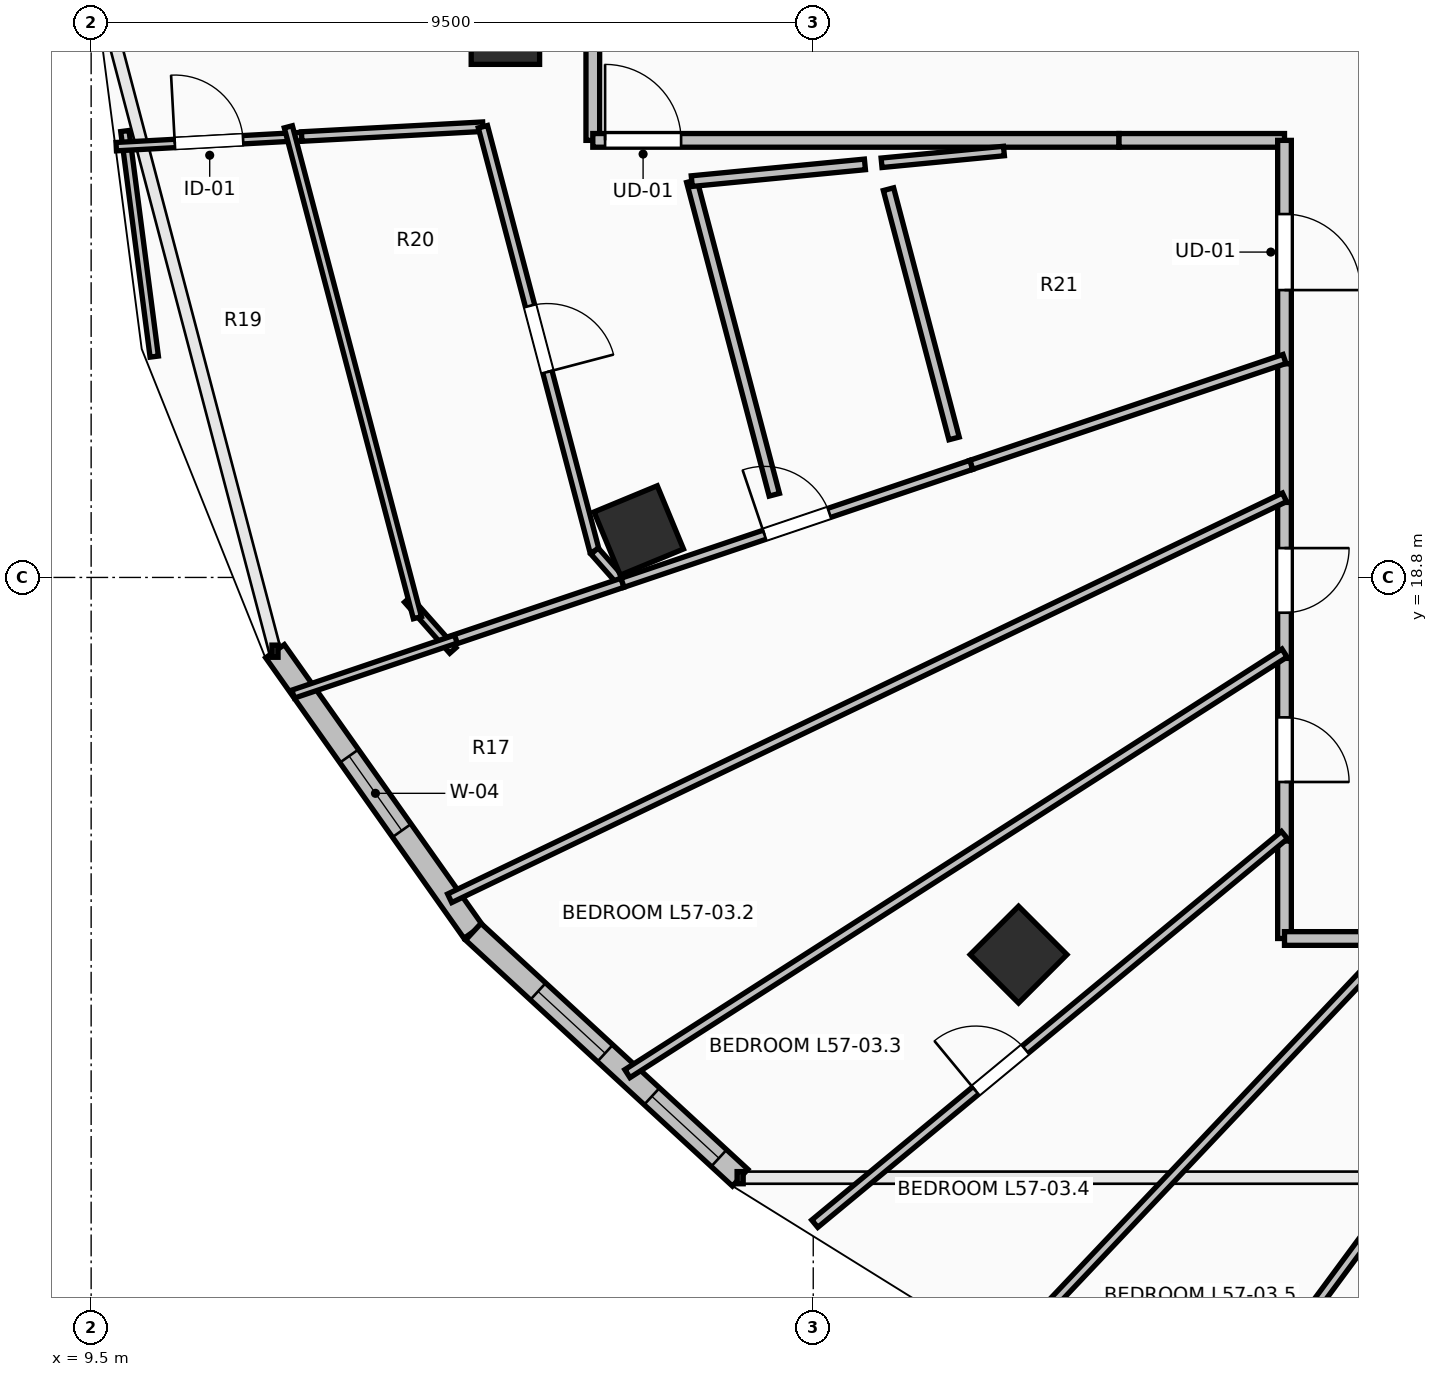
"""IFC4 building model, lengths in metres.
Left out: names, types, materials, properties, quantities, classifications, styles, units other than length and angle.
Written with IfcOpenShell. Run it as: python <this file> out.ifc"""

import sys

from ifc_helpers import new_model, si_unit, direction, frame, frame_2d, origin, origin_2d, place, context, subcontext, project, spatial, rectangle, extrude, element, fill, save


model = new_model("IFC4")
c1 = context("Model", 3, precision=1e-05, world=origin(), true_north=direction((0.0, 1.0)))
c2 = subcontext(c1, "Body", "Model", "MODEL_VIEW")
j1 = project(units=[si_unit("LENGTHUNIT", "METRE"), si_unit("PLANEANGLEUNIT", "RADIAN")], contexts=[c1])
p1 = place(None, origin())
s1 = spatial("IfcSite", under=j1, at=p1, CompositionType="ELEMENT")
p2 = place(p1, origin())
s2 = spatial("IfcBuilding", under=s1, at=p2, CompositionType="ELEMENT")
p3 = place(p2, frame((0.0, 0.0, 210.75)))
s3 = spatial("IfcBuildingStorey", under=s2, at=p3, CompositionType="ELEMENT", Elevation=210.75)
for number, where, z_axis, x_axis in (
    (1, (14.95, 26.0, 0.0), (0.0, 0.0, 1.0), (-1.0, 0.0, 0.0)),
    (2, (16.705, 19.418, 0.0), (0.0, 0.0, 1.0), (-0.924, -0.383, 0.0)),
    (3, (21.701, 13.838, 0.0), (0.0, 0.0, 1.0), (-0.707, -0.707, 0.0)),
):
    element("IfcColumn", number, at=place(p3, frame(where, z_axis=z_axis, x_axis=x_axis)), inside=s3, PredefinedType="COLUMN", context=c2, shape_type="SweptSolid", body=[
        extrude(rectangle(XDim=0.9, YDim=0.9, at=origin_2d()), origin(), (0.0, 0.0, 1.0), 3.55),
    ])
p4 = place(p3, frame((11.919, 17.83, 0.0), z_axis=(0.0, 0.0, 1.0), x_axis=(0.577168747264, -0.81662490605, 0.0)))
e4 = element("IfcWall", 4, at=p4, inside=s3, PredefinedType="STANDARD", context=c2, shape_type="SweptSolid", body=[
    extrude(rectangle(XDim=4.52, YDim=0.3, at=frame_2d((2.26, 0.0))), origin(), (0.0, 0.0, 1.0), 3.29),
])
p5 = place(p4, frame((1.69, 0.0, 0.85)))
e5 = element("IfcOpeningElement", 5, at=p5, cuts=e4, PredefinedType="OPENING", context=c2, shape_type="SweptSolid", body=[
    extrude(rectangle(XDim=1.2, YDim=1.95, at=frame_2d((0.6, 0.975))), frame((0.0, 0.165, 0.0), z_axis=(0.0, -1.0, 0.0), x_axis=(1.0, 0.0, 0.0)), (0.0, 0.0, 1.0), 0.33),
])
p6 = place(p3, frame((14.528, 14.139, 0.0), z_axis=(0.0, 0.0, 1.0), x_axis=(0.735359993374, -0.677676678177, 0.0)))
e6 = element("IfcWall", 6, at=p6, inside=s3, PredefinedType="STANDARD", context=c2, shape_type="SweptSolid", body=[
    extrude(rectangle(XDim=4.774, YDim=0.3, at=frame_2d((2.387, 0.0))), origin(), (0.0, 0.0, 1.0), 3.29),
])
p7 = place(p6, frame((1.158, 0.0, 0.85)))
e7 = element("IfcOpeningElement", 7, at=p7, cuts=e6, PredefinedType="OPENING", context=c2, shape_type="SweptSolid", body=[
    extrude(rectangle(XDim=1.2, YDim=1.95, at=frame_2d((0.6, 0.975))), frame((0.0, 0.165, 0.0), z_axis=(0.0, -1.0, 0.0), x_axis=(1.0, 0.0, 0.0)), (0.0, 0.0, 1.0), 0.33),
])
p8 = place(p6, frame((3.195, 0.0, 0.85)))
e8 = element("IfcOpeningElement", 8, at=p8, cuts=e6, PredefinedType="OPENING", context=c2, shape_type="SweptSolid", body=[
    extrude(rectangle(XDim=1.2, YDim=1.95, at=frame_2d((0.6, 0.975))), frame((0.0, 0.165, 0.0), z_axis=(0.0, -1.0, 0.0), x_axis=(1.0, 0.0, 0.0)), (0.0, 0.0, 1.0), 0.33),
])
p9 = place(p3, frame((16.1, 27.25, 0.0), z_axis=(0.0, 0.0, 1.0), x_axis=(0.0, -1.0, 0.0)))
e9 = element("IfcWall", 9, at=p9, inside=s3, PredefinedType="PARTITIONING", context=c2, shape_type="SweptSolid", body=[
    extrude(rectangle(XDim=2.7, YDim=0.18, at=frame_2d((1.35, 0.0))), origin(), (0.0, 0.0, 1.0), 2.482),
])
p10 = place(p3, frame((16.1, 24.55, 0.0), z_axis=(0.0, 0.0, 1.0), x_axis=(1.0, 0.0, 0.0)))
e10 = element("IfcWall", 10, at=p10, inside=s3, PredefinedType="PARTITIONING", context=c2, shape_type="SweptSolid", body=[
    extrude(rectangle(XDim=6.923, YDim=0.18, at=frame_2d((3.461, 0.0))), origin(), (0.0, 0.0, 1.0), 2.936),
])
p11 = place(p10, frame((0.162, 0.0, 0.0)))
e11 = element("IfcOpeningElement", 11, at=p11, cuts=e10, PredefinedType="OPENING", context=c2, shape_type="SweptSolid", body=[
    extrude(rectangle(XDim=1.0, YDim=2.15, at=frame_2d((0.5, 1.075))), frame((0.0, 0.105, 0.0), z_axis=(0.0, -1.0, 0.0), x_axis=(1.0, 0.0, 0.0)), (0.0, 0.0, 1.0), 0.21),
])
p12 = place(p3, frame((23.023, 24.55, 0.0), z_axis=(0.0, 0.0, 1.0), x_axis=(1.0, 0.0, 0.0)))
e12 = element("IfcWall", 12, at=p12, inside=s3, PredefinedType="PARTITIONING", context=c2, shape_type="SweptSolid", body=[
    extrude(rectangle(XDim=2.177, YDim=0.18, at=frame_2d((1.088, 0.0))), origin(), (0.0, 0.0, 1.0), 2.979),
])
p13 = place(p3, frame((25.2, 24.55, 0.0), z_axis=(0.0, 0.0, 1.0), x_axis=(0.0, -1.0, 0.0)))
e13 = element("IfcWall", 13, at=p13, inside=s3, PredefinedType="PARTITIONING", context=c2, shape_type="SweptSolid", body=[
    extrude(rectangle(XDim=2.939, YDim=0.18, at=frame_2d((1.469, 0.0))), origin(), (0.0, 0.0, 1.0), 3.29),
])
p14 = place(p13, frame((0.969, 0.0, 0.0)))
e14 = element("IfcOpeningElement", 14, at=p14, cuts=e13, PredefinedType="OPENING", context=c2, shape_type="SweptSolid", body=[
    extrude(rectangle(XDim=1.0, YDim=2.15, at=frame_2d((0.5, 1.075))), frame((0.0, 0.105, 0.0), z_axis=(0.0, -1.0, 0.0), x_axis=(1.0, 0.0, 0.0)), (0.0, 0.0, 1.0), 0.21),
])
p15 = place(p3, frame((25.2, 21.611, 0.0), z_axis=(0.0, 0.0, 1.0), x_axis=(0.0, -1.0, 0.0)))
e15 = element("IfcWall", 15, at=p15, inside=s3, PredefinedType="PARTITIONING", context=c2, shape_type="SweptSolid", body=[
    extrude(rectangle(XDim=1.824, YDim=0.18, at=frame_2d((0.912, 0.0))), origin(), (0.0, 0.0, 1.0), 3.29),
])
p16 = place(p3, frame((25.2, 19.787, 0.0), z_axis=(0.0, 0.0, 1.0), x_axis=(0.0, -1.0, 0.0)))
e16 = element("IfcWall", 16, at=p16, inside=s3, PredefinedType="PARTITIONING", context=c2, shape_type="SweptSolid", body=[
    extrude(rectangle(XDim=2.052, YDim=0.18, at=frame_2d((1.026, 0.0))), origin(), (0.0, 0.0, 1.0), 3.29),
])
p17 = place(p16, frame((0.601, 0.0, 0.0)))
e17 = element("IfcOpeningElement", 17, at=p17, cuts=e16, PredefinedType="OPENING", context=c2, shape_type="SweptSolid", body=[
    extrude(rectangle(XDim=0.85, YDim=2.1, at=frame_2d((0.425, 1.05))), frame((0.0, 0.105, 0.0), z_axis=(0.0, -1.0, 0.0), x_axis=(1.0, 0.0, 0.0)), (0.0, 0.0, 1.0), 0.21),
])
p18 = place(p3, frame((25.2, 17.735, 0.0), z_axis=(0.0, 0.0, 1.0), x_axis=(0.0, -1.0, 0.0)))
e18 = element("IfcWall", 18, at=p18, inside=s3, PredefinedType="PARTITIONING", context=c2, shape_type="SweptSolid", body=[
    extrude(rectangle(XDim=2.402, YDim=0.18, at=frame_2d((1.201, 0.0))), origin(), (0.0, 0.0, 1.0), 2.482),
])
p19 = place(p18, frame((0.776, 0.0, 0.0)))
e19 = element("IfcOpeningElement", 19, at=p19, cuts=e18, PredefinedType="OPENING", context=c2, shape_type="SweptSolid", body=[
    extrude(rectangle(XDim=0.85, YDim=2.1, at=frame_2d((0.425, 1.05))), frame((0.0, 0.105, 0.0), z_axis=(0.0, -1.0, 0.0), x_axis=(1.0, 0.0, 0.0)), (0.0, 0.0, 1.0), 0.21),
])
p20 = place(p3, frame((25.2, 15.333, 0.0), z_axis=(0.0, 0.0, 1.0), x_axis=(0.0, -1.0, 0.0)))
e20 = element("IfcWall", 20, at=p20, inside=s3, PredefinedType="PARTITIONING", context=c2, shape_type="SweptSolid", body=[
    extrude(rectangle(XDim=1.283, YDim=0.18, at=frame_2d((0.642, 0.0))), origin(), (0.0, 0.0, 1.0), 2.482),
])
p21 = place(p3, frame((25.2, 14.05, 0.0), z_axis=(0.0, 0.0, 1.0), x_axis=(1.0, 0.0, 0.0)))
e21 = element("IfcWall", 21, at=p21, inside=s3, PredefinedType="PARTITIONING", context=c2, shape_type="SweptSolid", body=[
    extrude(rectangle(XDim=1.55, YDim=0.18, at=frame_2d((0.775, 0.0))), origin(), (0.0, 0.0, 1.0), 2.936),
])
p22 = place(p3, frame((19.899, 24.255, 0.0), z_axis=(0.0, 0.0, 1.0), x_axis=(0.995395189956, 0.095856224692, 0.0)))
e22 = element("IfcWall", 22, at=p22, inside=s3, PredefinedType="PARTITIONING", context=c2, shape_type="SweptSolid", body=[
    extrude(rectangle(XDim=1.617, YDim=0.125, at=frame_2d((0.809, 0.0))), origin(), (0.0, 0.0, 1.0), 2.936),
])
p23 = place(p3, frame((21.079, 20.281, 0.0), z_axis=(0.0, 0.0, 1.0), x_axis=(0.947333376301, 0.320249081413, 0.0)))
e23 = element("IfcWall", 23, at=p23, inside=s3, PredefinedType="PARTITIONING", context=c2, shape_type="SweptSolid", body=[
    extrude(rectangle(XDim=4.35, YDim=0.125, at=frame_2d((2.175, 0.0))), origin(), (0.0, 0.0, 1.0), 2.979),
])
p24 = place(p3, frame((9.944, 24.673, 0.0), z_axis=(0.0, 0.0, 1.0), x_axis=(0.129053207858, -0.991637670493, 0.0)))
e24 = element("IfcWall", 24, at=p24, inside=s3, PredefinedType="PARTITIONING", context=c2, shape_type="SweptSolid", body=[
    extrude(rectangle(XDim=2.993, YDim=0.11, at=frame_2d((1.497, 0.0))), origin(), (0.0, 0.0, 1.0), 3.29),
])
p25 = place(p3, frame((9.83, 24.467, 0.0), z_axis=(0.0, 0.0, 1.0), x_axis=(0.998510664793, 0.054556872108, 0.0)))
e25 = element("IfcWall", 25, at=p25, inside=s3, PredefinedType="PARTITIONING", context=c2, shape_type="SweptSolid", body=[
    extrude(rectangle(XDim=2.443, YDim=0.11, at=frame_2d((1.222, 0.0))), origin(), (0.0, 0.0, 1.0), 3.29),
])
p26 = place(p25, frame((0.771, 0.0, 0.0)))
e26 = element("IfcOpeningElement", 26, at=p26, cuts=e25, PredefinedType="OPENING", context=c2, shape_type="SweptSolid", body=[
    extrude(rectangle(XDim=0.9, YDim=2.1, at=frame_2d((0.45, 1.05))), frame((0.0, 0.07, 0.0), z_axis=(0.0, -1.0, 0.0), x_axis=(1.0, 0.0, 0.0)), (0.0, 0.0, 1.0), 0.14),
])
p27 = place(p3, frame((12.27, 24.601, 0.0), z_axis=(0.0, 0.0, 1.0), x_axis=(0.998530633022, 0.054190173613, 0.0)))
e27 = element("IfcWall", 27, at=p27, inside=s3, PredefinedType="PARTITIONING", context=c2, shape_type="SweptSolid", body=[
    extrude(rectangle(XDim=2.388, YDim=0.125, at=frame_2d((1.194, 0.0))), origin(), (0.0, 0.0, 1.0), 3.29),
])
p28 = place(p3, frame((14.654, 24.73, 0.0), z_axis=(0.0, 0.0, 1.0), x_axis=(0.254457911505, -0.967083849143, 0.0)))
e28 = element("IfcWall", 28, at=p28, inside=s3, PredefinedType="PARTITIONING", context=c2, shape_type="SweptSolid", body=[
    extrude(rectangle(XDim=5.773, YDim=0.125, at=frame_2d((2.886, 0.0))), origin(), (0.0, 0.0, 1.0), 3.29),
])
p29 = place(p28, frame((2.437, 0.0, 0.0)))
e29 = element("IfcOpeningElement", 29, at=p29, cuts=e28, PredefinedType="OPENING", context=c2, shape_type="SweptSolid", body=[
    extrude(rectangle(XDim=0.9, YDim=2.1, at=frame_2d((0.45, 1.05))), frame((0.0, 0.077, 0.0), z_axis=(0.0, -1.0, 0.0), x_axis=(1.0, 0.0, 0.0)), (0.0, 0.0, 1.0), 0.155),
])
p30 = place(p3, frame((16.123, 19.147, 0.0), z_axis=(0.0, 0.0, 1.0), x_axis=(0.661607116759, -0.749850667169, 0.0)))
e30 = element("IfcWall", 30, at=p30, inside=s3, PredefinedType="PARTITIONING", context=c2, shape_type="SweptSolid", body=[
    extrude(rectangle(XDim=0.556, YDim=0.125, at=frame_2d((0.278, 0.0))), origin(), (0.0, 0.0, 1.0), 3.29),
])
p31 = place(p3, frame((16.491, 18.73, 0.0), z_axis=(0.0, 0.0, 1.0), x_axis=(-0.94734184591, -0.320224026251, 0.0)))
e31 = element("IfcWall", 31, at=p31, inside=s3, PredefinedType="PARTITIONING", context=c2, shape_type="SweptSolid", body=[
    extrude(rectangle(XDim=2.454, YDim=0.125, at=frame_2d((1.227, 0.0))), origin(), (0.0, 0.0, 1.0), 3.29),
])
p32 = place(p3, frame((16.491, 18.73, 0.0), z_axis=(0.0, 0.0, 1.0), x_axis=(0.947333893653, 0.320247551023, 0.0)))
e32 = element("IfcWall", 32, at=p32, inside=s3, PredefinedType="PARTITIONING", context=c2, shape_type="SweptSolid", body=[
    extrude(rectangle(XDim=4.843, YDim=0.125, at=frame_2d((2.422, 0.0))), origin(), (0.0, 0.0, 1.0), 2.482),
])
p33 = place(p32, frame((1.971, 0.0, 0.0)))
e33 = element("IfcOpeningElement", 33, at=p33, cuts=e32, PredefinedType="OPENING", context=c2, shape_type="SweptSolid", body=[
    extrude(rectangle(XDim=0.9, YDim=2.1, at=frame_2d((0.45, 1.05))), frame((0.0, 0.077, 0.0), z_axis=(0.0, -1.0, 0.0), x_axis=(1.0, 0.0, 0.0)), (0.0, 0.0, 1.0), 0.155),
])
p34 = place(p3, frame((14.259, 17.839, 0.0), z_axis=(0.0, 0.0, 1.0), x_axis=(-0.662791157339, 0.748804301372, 0.0)))
e34 = element("IfcWall", 34, at=p34, inside=s3, PredefinedType="PARTITIONING", context=c2, shape_type="SweptSolid", body=[
    extrude(rectangle(XDim=0.897, YDim=0.11, at=frame_2d((0.448, 0.0))), origin(), (0.0, 0.0, 1.0), 3.29),
])
p35 = place(p3, frame((13.792, 18.271, 0.0), z_axis=(0.0, 0.0, 1.0), x_axis=(-0.254286331735, 0.967128978727, 0.0)))
e35 = element("IfcWall", 35, at=p35, inside=s3, PredefinedType="PARTITIONING", context=c2, shape_type="SweptSolid", body=[
    extrude(rectangle(XDim=6.677, YDim=0.11, at=frame_2d((3.339, 0.0))), origin(), (0.0, 0.0, 1.0), 3.29),
])
p36 = place(p3, frame((12.157, 17.265, 0.0), z_axis=(0.0, 0.0, 1.0), x_axis=(0.947357185378, 0.320178642812, 0.0)))
e36 = element("IfcWall", 36, at=p36, inside=s3, PredefinedType="PARTITIONING", context=c2, shape_type="SweptSolid", body=[
    extrude(rectangle(XDim=2.26, YDim=0.11, at=frame_2d((1.13, 0.0))), origin(), (0.0, 0.0, 1.0), 3.29),
])
p37 = place(p3, frame((14.217, 14.579, 0.0), z_axis=(0.0, 0.0, 1.0), x_axis=(0.901423599975, 0.432938209689, 0.0)))
e37 = element("IfcWall", 37, at=p37, inside=s3, PredefinedType="PARTITIONING", context=c2, shape_type="SweptSolid", body=[
    extrude(rectangle(XDim=12.184, YDim=0.125, at=frame_2d((6.092, 0.0))), origin(), (0.0, 0.0, 1.0), 2.482),
])
p38 = place(p3, frame((16.555, 12.272, 0.0), z_axis=(0.0, 0.0, 1.0), x_axis=(0.842221721565, 0.539131312135, 0.0)))
e38 = element("IfcWall", 38, at=p38, inside=s3, PredefinedType="PARTITIONING", context=c2, shape_type="SweptSolid", body=[
    extrude(rectangle(XDim=10.265, YDim=0.125, at=frame_2d((5.132, 0.0))), origin(), (0.0, 0.0, 1.0), 2.482),
])
p39 = place(p3, frame((19.02, 10.298, 0.0), z_axis=(0.0, 0.0, 1.0), x_axis=(0.770494327523, 0.637446853671, 0.0)))
e39 = element("IfcWall", 39, at=p39, inside=s3, PredefinedType="PARTITIONING", context=c2, shape_type="SweptSolid", body=[
    extrude(rectangle(XDim=8.021, YDim=0.125, at=frame_2d((4.01, 0.0))), origin(), (0.0, 0.0, 1.0), 2.482),
])
p40 = place(p39, frame((2.746, 0.0, 0.0)))
e40 = element("IfcOpeningElement", 40, at=p40, cuts=e39, PredefinedType="OPENING", context=c2, shape_type="SweptSolid", body=[
    extrude(rectangle(XDim=0.85, YDim=2.1, at=frame_2d((0.425, 1.05))), frame((0.0, 0.077, 0.0), z_axis=(0.0, -1.0, 0.0), x_axis=(1.0, 0.0, 0.0)), (0.0, 0.0, 1.0), 0.155),
])
p41 = place(p3, frame((21.613, 8.686, 0.0), z_axis=(0.0, 0.0, 1.0), x_axis=(0.68740257318, 0.726276601844, 0.0)))
e41 = element("IfcWall", 41, at=p41, inside=s3, PredefinedType="PARTITIONING", context=c2, shape_type="SweptSolid", body=[
    extrude(rectangle(XDim=7.386, YDim=0.125, at=frame_2d((3.693, 0.0))), origin(), (0.0, 0.0, 1.0), 2.824),
])
p42 = place(p3, frame((24.298, 7.449, 0.0), z_axis=(0.0, 0.0, 1.0), x_axis=(0.594148459094, 0.804355399408, 0.0)))
e42 = element("IfcWall", 42, at=p42, inside=s3, PredefinedType="PARTITIONING", context=c2, shape_type="SweptSolid", body=[
    extrude(rectangle(XDim=8.207, YDim=0.125, at=frame_2d((4.103, 0.0))), origin(), (0.0, 0.0, 1.0), 2.482),
])
p43 = place(p3, frame((18.488, 19.888, 0.0), z_axis=(0.0, 0.0, 1.0), x_axis=(-0.254527099131, 0.967065641933, 0.0)))
e43 = element("IfcWall", 43, at=p43, inside=s3, PredefinedType="PARTITIONING", context=c2, shape_type="SweptSolid", body=[
    extrude(rectangle(XDim=4.267, YDim=0.14, at=frame_2d((2.133, 0.0))), origin(), (0.0, 0.0, 1.0), 3.29),
])
p44 = place(p3, frame((17.402, 24.014, 0.0), z_axis=(0.0, 0.0, 1.0), x_axis=(0.99536946046, 0.096123031498, 0.0)))
e44 = element("IfcWall", 44, at=p44, inside=s3, PredefinedType="PARTITIONING", context=c2, shape_type="SweptSolid", body=[
    extrude(rectangle(XDim=2.288, YDim=0.14, at=frame_2d((1.144, 0.0))), origin(), (0.0, 0.0, 1.0), 2.936),
])
p45 = place(p3, frame((19.99, 23.908, 0.0), z_axis=(0.0, 0.0, 1.0), x_axis=(0.25452874074, -0.967065209868, 0.0)))
e45 = element("IfcWall", 45, at=p45, inside=s3, PredefinedType="PARTITIONING", context=c2, shape_type="SweptSolid", body=[
    extrude(rectangle(XDim=3.391, YDim=0.14, at=frame_2d((1.695, 0.0))), origin(), (0.0, 0.0, 1.0), 2.936),
])
p46 = place(p5, origin())
e46 = element("IfcWindow", 46, at=p46, inside=s3, PartitioningType="SINGLE_PANEL", PredefinedType="WINDOW", context=c2, shape_type="SweptSolid", body=[
    extrude(rectangle(XDim=1.2, YDim=1.95, at=frame_2d((0.6, 0.975))), frame((0.0, 0.03, 0.0), z_axis=(0.0, -1.0, 0.0), x_axis=(1.0, 0.0, 0.0)), (0.0, 0.0, 1.0), 0.06),
])
fill(e5, e46)
p47 = place(p7, origin())
e47 = element("IfcWindow", 47, at=p47, inside=s3, PartitioningType="SINGLE_PANEL", PredefinedType="WINDOW", context=c2, shape_type="SweptSolid", body=[
    extrude(rectangle(XDim=1.2, YDim=1.95, at=frame_2d((0.6, 0.975))), frame((0.0, 0.03, 0.0), z_axis=(0.0, -1.0, 0.0), x_axis=(1.0, 0.0, 0.0)), (0.0, 0.0, 1.0), 0.06),
])
fill(e7, e47)
p48 = place(p8, origin())
e48 = element("IfcWindow", 48, at=p48, inside=s3, PartitioningType="SINGLE_PANEL", PredefinedType="WINDOW", context=c2, shape_type="SweptSolid", body=[
    extrude(rectangle(XDim=1.2, YDim=1.95, at=frame_2d((0.6, 0.975))), frame((0.0, 0.03, 0.0), z_axis=(0.0, -1.0, 0.0), x_axis=(1.0, 0.0, 0.0)), (0.0, 0.0, 1.0), 0.06),
])
fill(e8, e48)
p49 = place(p11, origin())
e49 = element("IfcDoor", 49, at=p49, inside=s3, OperationType="SINGLE_SWING_LEFT", PredefinedType="DOOR", context=c2, shape_type="SweptSolid", body=[
    extrude(rectangle(XDim=1.0, YDim=2.15, at=frame_2d((0.5, 1.075))), frame((0.0, 0.025, 0.0), z_axis=(0.0, -1.0, 0.0), x_axis=(1.0, 0.0, 0.0)), (0.0, 0.0, 1.0), 0.05),
])
fill(e11, e49)
p50 = place(p14, origin())
e50 = element("IfcDoor", 50, at=p50, inside=s3, OperationType="SINGLE_SWING_RIGHT", PredefinedType="DOOR", context=c2, shape_type="SweptSolid", body=[
    extrude(rectangle(XDim=1.0, YDim=2.15, at=frame_2d((0.5, 1.075))), frame((0.0, 0.025, 0.0), z_axis=(0.0, -1.0, 0.0), x_axis=(1.0, 0.0, 0.0)), (0.0, 0.0, 1.0), 0.05),
])
fill(e14, e50)
p51 = place(p26, origin())
e51 = element("IfcDoor", 51, at=p51, inside=s3, OperationType="SINGLE_SWING_LEFT", PredefinedType="DOOR", context=c2, shape_type="SweptSolid", body=[
    extrude(rectangle(XDim=0.9, YDim=2.1, at=frame_2d((0.45, 1.05))), frame((0.0, 0.025, 0.0), z_axis=(0.0, -1.0, 0.0), x_axis=(1.0, 0.0, 0.0)), (0.0, 0.0, 1.0), 0.05),
])
fill(e26, e51)
p52 = place(p29, origin())
e52 = element("IfcDoor", 52, at=p52, inside=s3, OperationType="SINGLE_SWING_RIGHT", PredefinedType="DOOR", context=c2, shape_type="SweptSolid", body=[
    extrude(rectangle(XDim=0.9, YDim=2.1, at=frame_2d((0.45, 1.05))), frame((0.0, 0.025, 0.0), z_axis=(0.0, -1.0, 0.0), x_axis=(1.0, 0.0, 0.0)), (0.0, 0.0, 1.0), 0.05),
])
fill(e29, e52)
p53 = place(p33, origin())
e53 = element("IfcDoor", 53, at=p53, inside=s3, OperationType="SINGLE_SWING_LEFT", PredefinedType="DOOR", context=c2, shape_type="SweptSolid", body=[
    extrude(rectangle(XDim=0.9, YDim=2.1, at=frame_2d((0.45, 1.05))), frame((0.0, 0.025, 0.0), z_axis=(0.0, -1.0, 0.0), x_axis=(1.0, 0.0, 0.0)), (0.0, 0.0, 1.0), 0.05),
])
fill(e33, e53)
p54 = place(p17, origin())
e54 = element("IfcDoor", 54, at=p54, inside=s3, OperationType="SINGLE_SWING_LEFT", PredefinedType="DOOR", context=c2, shape_type="SweptSolid", body=[
    extrude(rectangle(XDim=0.85, YDim=2.1, at=frame_2d((0.425, 1.05))), frame((0.0, 0.025, 0.0), z_axis=(0.0, -1.0, 0.0), x_axis=(1.0, 0.0, 0.0)), (0.0, 0.0, 1.0), 0.05),
])
fill(e17, e54)
p55 = place(p19, origin())
e55 = element("IfcDoor", 55, at=p55, inside=s3, OperationType="SINGLE_SWING_RIGHT", PredefinedType="DOOR", context=c2, shape_type="SweptSolid", body=[
    extrude(rectangle(XDim=0.85, YDim=2.1, at=frame_2d((0.425, 1.05))), frame((0.0, 0.025, 0.0), z_axis=(0.0, -1.0, 0.0), x_axis=(1.0, 0.0, 0.0)), (0.0, 0.0, 1.0), 0.05),
])
fill(e19, e55)
p56 = place(p40, origin())
e56 = element("IfcDoor", 56, at=p56, inside=s3, OperationType="SINGLE_SWING_LEFT", PredefinedType="DOOR", context=c2, shape_type="SweptSolid", body=[
    extrude(rectangle(XDim=0.85, YDim=2.1, at=frame_2d((0.425, 1.05))), frame((0.0, 0.025, 0.0), z_axis=(0.0, -1.0, 0.0), x_axis=(1.0, 0.0, 0.0)), (0.0, 0.0, 1.0), 0.05),
])
fill(e40, e56)
save(model, sys.argv[1])
